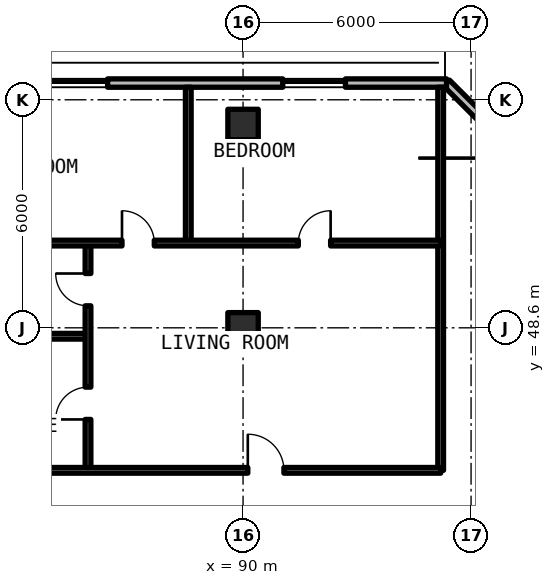
"""IFC4 building model, lengths in metres.
Left out: names, types, materials, properties, quantities, classifications, styles, units other than length and angle.
Written with IfcOpenShell. Run it as: python <this file> out.ifc"""

import sys

from ifc_helpers import new_model, si_unit, direction, frame, frame_2d, origin, origin_2d, place, context, subcontext, project, spatial, rectangle, extrude, element, fill, save


model = new_model("IFC4")
c1 = context("Model", 3, precision=1e-05, world=origin(), true_north=direction((0.0, 1.0)))
c2 = subcontext(c1, "Body", "Model", "MODEL_VIEW")
j1 = project(units=[si_unit("LENGTHUNIT", "METRE"), si_unit("PLANEANGLEUNIT", "RADIAN")], contexts=[c1])
p1 = place(None, origin())
s1 = spatial("IfcSite", under=j1, at=p1, CompositionType="ELEMENT")
p2 = place(p1, origin())
s2 = spatial("IfcBuilding", under=s1, at=p2, CompositionType="ELEMENT")
p3 = place(p2, frame((0.0, 0.0, 191.73)))
s3 = spatial("IfcBuildingStorey", under=s2, at=p3, CompositionType="ELEMENT", Elevation=191.73)
for number, where, z_axis, x_axis in (
    (1, (90.0, 48.6, 0.0), (0.0, 0.0, 1.0), (1.0, 0.0, 0.0)),
    (2, (90.0, 53.95, 0.0), (0.0, 0.0, 1.0), (1.0, 0.0, 0.0)),
):
    element("IfcColumn", number, at=place(p3, frame(where, z_axis=z_axis, x_axis=x_axis)), inside=s3, PredefinedType="COLUMN", context=c2, shape_type="SweptSolid", body=[
        extrude(rectangle(XDim=0.8, YDim=0.8, at=origin_2d()), origin(), (0.0, 0.0, 1.0), 3.3),
    ])
p4 = place(p3, frame((99.49, 50.904, 0.0), z_axis=(0.0, 0.0, 1.0), x_axis=(-0.707085909342, 0.707127652415, 0.0)))
e3 = element("IfcWall", 3, at=p4, inside=s3, PredefinedType="SOLIDWALL", context=c2, shape_type="SweptSolid", body=[
    extrude(rectangle(XDim=5.849, YDim=0.22, at=frame_2d((2.924, 0.0))), origin(), (0.0, 0.0, 1.0), 3.08),
])
p5 = place(p4, frame((1.224, 0.0, 0.78)))
e4 = element("IfcOpeningElement", 4, at=p5, cuts=e3, PredefinedType="OPENING", context=c2, shape_type="SweptSolid", body=[
    extrude(rectangle(XDim=3.4, YDim=1.66, at=frame_2d((1.7, 0.83))), frame((0.0, 0.12, 0.0), z_axis=(0.0, -1.0, 0.0), x_axis=(1.0, 0.0, 0.0)), (0.0, 0.0, 1.0), 0.24),
])
p6 = place(p3, frame((95.354, 55.04, 0.0), z_axis=(0.0, 0.0, 1.0), x_axis=(-1.0, 0.0, 0.0)))
e5 = element("IfcWall", 5, at=p6, inside=s3, PredefinedType="SOLIDWALL", context=c2, shape_type="SweptSolid", body=[
    extrude(rectangle(XDim=43.244, YDim=0.22, at=frame_2d((21.622, 0.0))), origin(), (0.0, 0.0, 1.0), 3.08),
])
p7 = place(p6, frame((25.704, 0.0, 0.0)))
e6 = element("IfcOpeningElement", 6, at=p7, cuts=e5, PredefinedType="OPENING", context=c2, shape_type="SweptSolid", body=[
    extrude(rectangle(XDim=1.1, YDim=2.15, at=frame_2d((0.55, 1.075))), frame((0.0, 0.12, 0.0), z_axis=(0.0, -1.0, 0.0), x_axis=(1.0, 0.0, 0.0)), (0.0, 0.0, 1.0), 0.24),
])
p8 = place(p6, frame((19.104, 0.0, 0.0)))
e7 = element("IfcOpeningElement", 7, at=p8, cuts=e5, PredefinedType="OPENING", context=c2, shape_type="SweptSolid", body=[
    extrude(rectangle(XDim=1.1, YDim=2.15, at=frame_2d((0.55, 1.075))), frame((0.0, 0.12, 0.0), z_axis=(0.0, -1.0, 0.0), x_axis=(1.0, 0.0, 0.0)), (0.0, 0.0, 1.0), 0.24),
])
p9 = place(p6, frame((36.749, 0.0, 0.78)))
e8 = element("IfcOpeningElement", 8, at=p9, cuts=e5, PredefinedType="OPENING", context=c2, shape_type="SweptSolid", body=[
    extrude(rectangle(XDim=1.65, YDim=1.66, at=frame_2d((0.825, 0.83))), frame((0.0, 0.12, 0.0), z_axis=(0.0, -1.0, 0.0), x_axis=(1.0, 0.0, 0.0)), (0.0, 0.0, 1.0), 0.24),
])
p10 = place(p6, frame((30.199, 0.0, 0.78)))
e9 = element("IfcOpeningElement", 9, at=p10, cuts=e5, PredefinedType="OPENING", context=c2, shape_type="SweptSolid", body=[
    extrude(rectangle(XDim=0.85, YDim=1.65, at=frame_2d((0.425, 0.825))), frame((0.0, 0.12, 0.0), z_axis=(0.0, -1.0, 0.0), x_axis=(1.0, 0.0, 0.0)), (0.0, 0.0, 1.0), 0.24),
])
p11 = place(p6, frame((8.918, 0.0, 0.78)))
e10 = element("IfcOpeningElement", 10, at=p11, cuts=e5, PredefinedType="OPENING", context=c2, shape_type="SweptSolid", body=[
    extrude(rectangle(XDim=1.65, YDim=1.66, at=frame_2d((0.825, 0.83))), frame((0.0, 0.12, 0.0), z_axis=(0.0, -1.0, 0.0), x_axis=(1.0, 0.0, 0.0)), (0.0, 0.0, 1.0), 0.24),
])
p12 = place(p6, frame((2.66, 0.0, 0.78)))
e11 = element("IfcOpeningElement", 11, at=p12, cuts=e5, PredefinedType="OPENING", context=c2, shape_type="SweptSolid", body=[
    extrude(rectangle(XDim=1.65, YDim=1.66, at=frame_2d((0.825, 0.83))), frame((0.0, 0.12, 0.0), z_axis=(0.0, -1.0, 0.0), x_axis=(1.0, 0.0, 0.0)), (0.0, 0.0, 1.0), 0.24),
])
p13 = place(p3, frame((95.2, 44.85, 0.0), z_axis=(0.0, 0.0, 1.0), x_axis=(0.0, 1.0, 0.0)))
e12 = element("IfcWall", 12, at=p13, inside=s3, PredefinedType="SOLIDWALL", context=c2, shape_type="SweptSolid", body=[
    extrude(rectangle(XDim=10.08, YDim=0.15, at=frame_2d((5.04, 0.0))), origin(), (0.0, 0.0, 1.0), 2.35),
])
p14 = place(p3, frame((81.364, 48.378, 0.0), z_axis=(0.0, 0.0, 1.0), x_axis=(1.0, 0.0, 0.0)))
e13 = element("IfcWall", 13, at=p14, inside=s3, PredefinedType="PARTITIONING", context=c2, shape_type="SweptSolid", body=[
    extrude(rectangle(XDim=4.556, YDim=0.15, at=frame_2d((2.278, 0.0))), origin(), (0.0, 0.0, 1.0), 2.35),
])
p15 = place(p3, frame((85.92, 44.85, 0.0), z_axis=(0.0, 0.0, 1.0), x_axis=(0.0, 1.0, 0.0)))
e14 = element("IfcWall", 14, at=p15, inside=s3, PredefinedType="PARTITIONING", context=c2, shape_type="SweptSolid", body=[
    extrude(rectangle(XDim=5.98, YDim=0.15, at=frame_2d((2.99, 0.0))), origin(), (0.0, 0.0, 1.0), 2.35),
])
p16 = place(p15, frame((1.339, 0.0, 0.0)))
e15 = element("IfcOpeningElement", 15, at=p16, cuts=e14, PredefinedType="OPENING", context=c2, shape_type="SweptSolid", body=[
    extrude(rectangle(XDim=0.85, YDim=2.1, at=frame_2d((0.425, 1.05))), frame((0.0, 0.085, 0.0), z_axis=(0.0, -1.0, 0.0), x_axis=(1.0, 0.0, 0.0)), (0.0, 0.0, 1.0), 0.17),
])
p17 = place(p15, frame((4.329, 0.0, 0.0)))
e16 = element("IfcOpeningElement", 16, at=p17, cuts=e14, PredefinedType="OPENING", context=c2, shape_type="SweptSolid", body=[
    extrude(rectangle(XDim=0.85, YDim=2.1, at=frame_2d((0.425, 1.05))), frame((0.0, 0.085, 0.0), z_axis=(0.0, -1.0, 0.0), x_axis=(1.0, 0.0, 0.0)), (0.0, 0.0, 1.0), 0.17),
])
p18 = place(p3, frame((88.559, 50.83, 0.0), z_axis=(0.0, 0.0, 1.0), x_axis=(0.0, 1.0, 0.0)))
e17 = element("IfcWall", 17, at=p18, inside=s3, PredefinedType="PARTITIONING", context=c2, shape_type="SweptSolid", body=[
    extrude(rectangle(XDim=4.1, YDim=0.15, at=frame_2d((2.05, 0.0))), origin(), (0.0, 0.0, 1.0), 2.35),
])
p19 = place(p3, frame((81.364, 50.83, 0.0), z_axis=(0.0, 0.0, 1.0), x_axis=(1.0, 0.0, 0.0)))
e18 = element("IfcWall", 18, at=p19, inside=s3, PredefinedType="PARTITIONING", context=c2, shape_type="SweptSolid", body=[
    extrude(rectangle(XDim=13.836, YDim=0.15, at=frame_2d((6.918, 0.0))), origin(), (0.0, 0.0, 1.0), 2.35),
])
p20 = place(p19, frame((5.45, 0.0, 0.0)))
e19 = element("IfcOpeningElement", 19, at=p20, cuts=e18, PredefinedType="OPENING", context=c2, shape_type="SweptSolid", body=[
    extrude(rectangle(XDim=0.85, YDim=2.1, at=frame_2d((0.425, 1.05))), frame((0.0, 0.085, 0.0), z_axis=(0.0, -1.0, 0.0), x_axis=(1.0, 0.0, 0.0)), (0.0, 0.0, 1.0), 0.17),
])
p21 = place(p19, frame((10.09, 0.0, 0.0)))
e20 = element("IfcOpeningElement", 20, at=p21, cuts=e18, PredefinedType="OPENING", context=c2, shape_type="SweptSolid", body=[
    extrude(rectangle(XDim=0.85, YDim=2.1, at=frame_2d((0.425, 1.05))), frame((0.0, 0.085, 0.0), z_axis=(0.0, -1.0, 0.0), x_axis=(1.0, 0.0, 0.0)), (0.0, 0.0, 1.0), 0.17),
])
p22 = place(p3, frame((81.364, 44.85, 0.0), z_axis=(0.0, 0.0, 1.0), x_axis=(1.0, 0.0, 0.0)))
e21 = element("IfcWall", 21, at=p22, inside=s3, PredefinedType="SOLIDWALL", context=c2, shape_type="SweptSolid", body=[
    extrude(rectangle(XDim=13.836, YDim=0.15, at=frame_2d((6.918, 0.0))), origin(), (0.0, 0.0, 1.0), 2.35),
])
p23 = place(p22, frame((8.761, 0.0, 0.0)))
e22 = element("IfcOpeningElement", 22, at=p23, cuts=e21, PredefinedType="OPENING", context=c2, shape_type="SweptSolid", body=[
    extrude(rectangle(XDim=0.95, YDim=2.15, at=frame_2d((0.475, 1.075))), frame((0.0, 0.085, 0.0), z_axis=(0.0, -1.0, 0.0), x_axis=(1.0, 0.0, 0.0)), (0.0, 0.0, 1.0), 0.17),
])
p24 = place(p11, origin())
e23 = element("IfcWindow", 23, at=p24, inside=s3, PartitioningType="SINGLE_PANEL", PredefinedType="WINDOW", context=c2, shape_type="SweptSolid", body=[
    extrude(rectangle(XDim=1.65, YDim=1.66, at=frame_2d((0.825, 0.83))), frame((0.0, 0.03, 0.0), z_axis=(0.0, -1.0, 0.0), x_axis=(1.0, 0.0, 0.0)), (0.0, 0.0, 1.0), 0.06),
])
fill(e10, e23)
p25 = place(p12, origin())
e24 = element("IfcWindow", 24, at=p25, inside=s3, PartitioningType="SINGLE_PANEL", PredefinedType="WINDOW", context=c2, shape_type="SweptSolid", body=[
    extrude(rectangle(XDim=1.65, YDim=1.66, at=frame_2d((0.825, 0.83))), frame((0.0, 0.03, 0.0), z_axis=(0.0, -1.0, 0.0), x_axis=(1.0, 0.0, 0.0)), (0.0, 0.0, 1.0), 0.06),
])
fill(e11, e24)
p26 = place(p16, origin())
e25 = element("IfcDoor", 25, at=p26, inside=s3, OperationType="SINGLE_SWING_LEFT", PredefinedType="DOOR", context=c2, shape_type="SweptSolid", body=[
    extrude(rectangle(XDim=0.85, YDim=2.1, at=frame_2d((0.425, 1.05))), frame((0.0, 0.025, 0.0), z_axis=(0.0, -1.0, 0.0), x_axis=(1.0, 0.0, 0.0)), (0.0, 0.0, 1.0), 0.05),
])
fill(e15, e25)
p27 = place(p17, origin())
e26 = element("IfcDoor", 26, at=p27, inside=s3, OperationType="SINGLE_SWING_RIGHT", PredefinedType="DOOR", context=c2, shape_type="SweptSolid", body=[
    extrude(rectangle(XDim=0.85, YDim=2.1, at=frame_2d((0.425, 1.05))), frame((0.0, 0.025, 0.0), z_axis=(0.0, -1.0, 0.0), x_axis=(1.0, 0.0, 0.0)), (0.0, 0.0, 1.0), 0.05),
])
fill(e16, e26)
p28 = place(p20, origin())
e27 = element("IfcDoor", 27, at=p28, inside=s3, OperationType="SINGLE_SWING_LEFT", PredefinedType="DOOR", context=c2, shape_type="SweptSolid", body=[
    extrude(rectangle(XDim=0.85, YDim=2.1, at=frame_2d((0.425, 1.05))), frame((0.0, 0.025, 0.0), z_axis=(0.0, -1.0, 0.0), x_axis=(1.0, 0.0, 0.0)), (0.0, 0.0, 1.0), 0.05),
])
fill(e19, e27)
p29 = place(p21, origin())
e28 = element("IfcDoor", 28, at=p29, inside=s3, OperationType="SINGLE_SWING_RIGHT", PredefinedType="DOOR", context=c2, shape_type="SweptSolid", body=[
    extrude(rectangle(XDim=0.85, YDim=2.1, at=frame_2d((0.425, 1.05))), frame((0.0, 0.025, 0.0), z_axis=(0.0, -1.0, 0.0), x_axis=(1.0, 0.0, 0.0)), (0.0, 0.0, 1.0), 0.05),
])
fill(e20, e28)
p30 = place(p23, origin())
e29 = element("IfcDoor", 29, at=p30, inside=s3, OperationType="SINGLE_SWING_LEFT", PredefinedType="DOOR", context=c2, shape_type="SweptSolid", body=[
    extrude(rectangle(XDim=0.95, YDim=2.15, at=frame_2d((0.475, 1.075))), frame((0.0, 0.025, 0.0), z_axis=(0.0, -1.0, 0.0), x_axis=(1.0, 0.0, 0.0)), (0.0, 0.0, 1.0), 0.05),
])
fill(e22, e29)
save(model, sys.argv[1])
